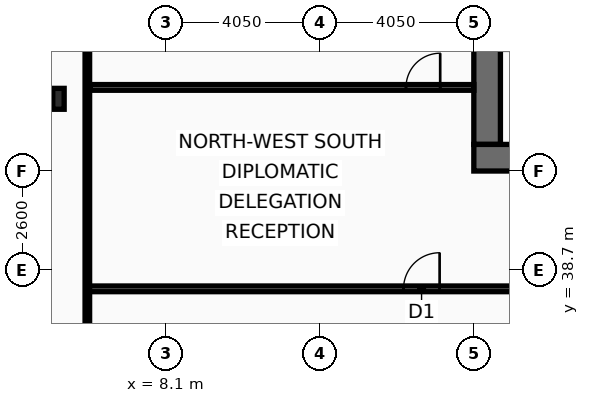
"""IFC4 building model, lengths in metres.
Left out: names, types, materials, properties, quantities, classifications, styles, units other than length and angle.
Written with IfcOpenShell. Run it as: python <this file> out.ifc"""

import sys

from ifc_helpers import new_model, si_unit, direction, frame, frame_2d, origin, origin_2d, place, context, subcontext, project, spatial, rectangle, i_section, extrude, element, fill, save


model = new_model("IFC4")
c1 = context("Model", 3, precision=1e-05, world=origin(), true_north=direction((0.0, 1.0)))
c2 = subcontext(c1, "Body", "Model", "MODEL_VIEW")
j1 = project(units=[si_unit("LENGTHUNIT", "METRE"), si_unit("PLANEANGLEUNIT", "RADIAN")], contexts=[c1])
p1 = place(None, origin())
s1 = spatial("IfcSite", under=j1, at=p1, CompositionType="ELEMENT")
p2 = place(p1, origin())
s2 = spatial("IfcBuilding", under=s1, at=p2, CompositionType="ELEMENT")
p3 = place(p2, frame((0.0, 0.0, 143.4)))
s3 = spatial("IfcBuildingStorey", under=s2, at=p3, CompositionType="ELEMENT", Elevation=143.4)
p4 = place(p3, frame((16.55, 42.0, 0.0), z_axis=(0.0, 0.0, 1.0), x_axis=(0.0, 1.0, 0.0)))
e1 = element("IfcWall", 1, at=p4, inside=s3, PredefinedType="SHEAR", context=c2, shape_type="SweptSolid", body=[
    extrude(rectangle(XDim=11.0, YDim=0.7, at=frame_2d((5.5, 0.0))), origin(), (0.0, 0.0, 1.0), 3.44),
])
p5 = place(p3, frame((18.65, 41.65, 0.0), z_axis=(0.0, 0.0, 1.0), x_axis=(-1.0, 0.0, 0.0)))
e2 = element("IfcWall", 2, at=p5, inside=s3, PredefinedType="SHEAR", context=c2, shape_type="SweptSolid", body=[
    extrude(rectangle(XDim=2.45, YDim=0.7, at=frame_2d((1.225, 0.0))), origin(), (0.0, 0.0, 1.0), 3.44),
])
p6 = place(p3, frame((5.27, 43.2, 0.0), z_axis=(0.0, 0.0, 1.0), x_axis=(1.0, 0.0, 0.0)))
e3 = element("IfcColumn", 3, at=p6, inside=s3, PredefinedType="COLUMN", context=c2, shape_type="SweptSolid", body=[
    extrude(i_section(OverallWidth=0.3, OverallDepth=0.55, WebThickness=0.015, FlangeThickness=0.029, at=origin_2d()), origin(), (0.0, 0.0, 1.0), 3.6),
])
p7 = place(p3, frame((6.03, 38.2, 0.0), z_axis=(0.0, 0.0, 1.0), x_axis=(1.0, 0.0, 0.0)))
e4 = element("IfcWall", 4, at=p7, inside=s3, PredefinedType="PARTITIONING", context=c2, shape_type="SweptSolid", body=[
    extrude(rectangle(XDim=12.52, YDim=0.15, at=frame_2d((6.26, 0.0))), origin(), (0.0, 0.0, 1.0), 2.73),
])
p8 = place(p7, frame((8.32, 0.0, 0.0)))
e5 = element("IfcOpeningElement", 5, at=p8, cuts=e4, PredefinedType="OPENING", context=c2, shape_type="SweptSolid", body=[
    extrude(rectangle(XDim=0.95, YDim=2.05, at=frame_2d((0.475, 1.025))), frame((0.0, 0.085, 0.0), z_axis=(0.0, -1.0, 0.0), x_axis=(1.0, 0.0, 0.0)), (0.0, 0.0, 1.0), 0.17),
])
p9 = place(p3, frame((6.095, 43.5, 0.0), z_axis=(0.0, 0.0, 1.0), x_axis=(1.0, 0.0, 0.0)))
e6 = element("IfcWall", 6, at=p9, inside=s3, PredefinedType="PARTITIONING", context=c2, shape_type="SweptSolid", body=[
    extrude(rectangle(XDim=10.105, YDim=0.15, at=frame_2d((5.052, 0.0))), origin(), (0.0, 0.0, 1.0), 2.73),
])
p10 = place(p9, frame((8.32, 0.0, 0.0)))
e7 = element("IfcOpeningElement", 7, at=p10, cuts=e6, PredefinedType="OPENING", context=c2, shape_type="SweptSolid", body=[
    extrude(rectangle(XDim=0.9, YDim=2.05, at=frame_2d((0.45, 1.025))), frame((0.0, 0.085, 0.0), z_axis=(0.0, -1.0, 0.0), x_axis=(1.0, 0.0, 0.0)), (0.0, 0.0, 1.0), 0.17),
])
p11 = place(p3, frame((6.03, 10.665, 0.0), z_axis=(0.0, 0.0, 1.0), x_axis=(0.0, 1.0, 0.0)))
e8 = element("IfcWall", 8, at=p11, inside=s3, PredefinedType="PARTITIONING", context=c2, shape_type="SweptSolid", body=[
    extrude(rectangle(XDim=42.11, YDim=0.12, at=frame_2d((21.055, 0.0))), origin(), (0.0, 0.0, 1.0), 2.73),
])
p12 = place(p8, origin())
e9 = element("IfcDoor", 9, at=p12, inside=s3, OperationType="SINGLE_SWING_RIGHT", PredefinedType="DOOR", context=c2, shape_type="SweptSolid", body=[
    extrude(rectangle(XDim=0.95, YDim=2.05, at=frame_2d((0.475, 1.025))), frame((0.0, 0.025, 0.0), z_axis=(0.0, -1.0, 0.0), x_axis=(1.0, 0.0, 0.0)), (0.0, 0.0, 1.0), 0.05),
])
fill(e5, e9)
p13 = place(p10, origin())
e10 = element("IfcDoor", 10, at=p13, inside=s3, OperationType="SINGLE_SWING_RIGHT", PredefinedType="DOOR", context=c2, shape_type="SweptSolid", body=[
    extrude(rectangle(XDim=0.9, YDim=2.05, at=frame_2d((0.45, 1.025))), frame((0.0, 0.025, 0.0), z_axis=(0.0, -1.0, 0.0), x_axis=(1.0, 0.0, 0.0)), (0.0, 0.0, 1.0), 0.05),
])
fill(e7, e10)
save(model, sys.argv[1])
